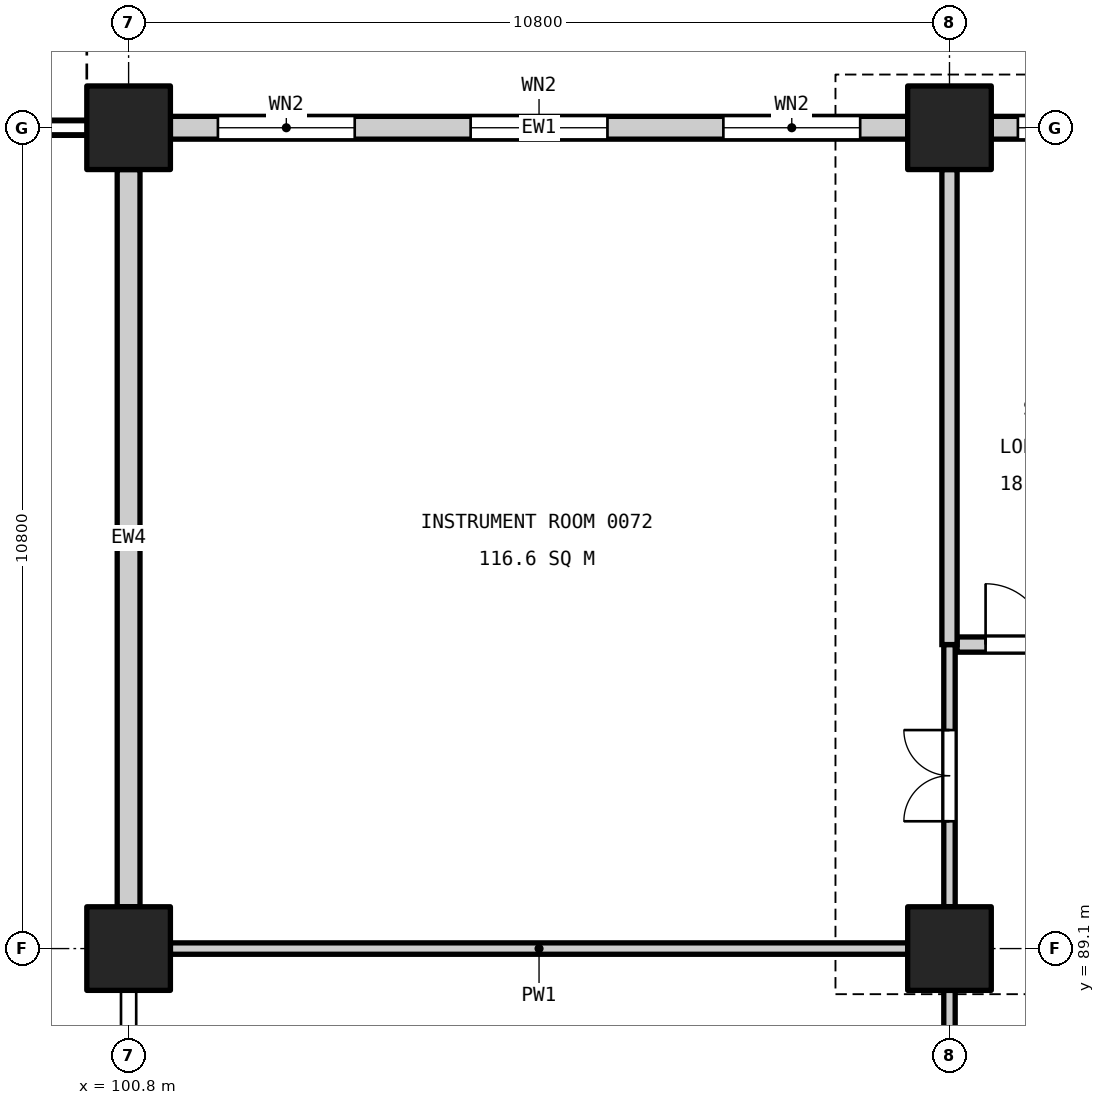
"""IFC4 building model, lengths in metres.
Left out: names, types, materials, properties, quantities, classifications, styles, units other than length and angle.
Written with IfcOpenShell. Run it as: python <this file> out.ifc"""

import sys

from ifc_helpers import new_model, si_unit, direction, frame, frame_2d, origin, origin_2d, place, context, subcontext, project, spatial, rectangle, extrude, element, fill, save


model = new_model("IFC4")
c1 = context("Model", 3, precision=1e-05, world=origin(), true_north=direction((0.0, 1.0)))
c2 = subcontext(c1, "Body", "Model", "MODEL_VIEW")
j1 = project(units=[si_unit("LENGTHUNIT", "METRE"), si_unit("PLANEANGLEUNIT", "RADIAN")], contexts=[c1])
p1 = place(None, origin())
s1 = spatial("IfcSite", under=j1, at=p1, CompositionType="ELEMENT")
p2 = place(p1, origin())
s2 = spatial("IfcBuilding", under=s1, at=p2, CompositionType="ELEMENT")
p3 = place(p2, origin())
s3 = spatial("IfcBuildingStorey", under=s2, at=p3, CompositionType="ELEMENT", Elevation=0.0)
for number, where, z_axis, x_axis in (
    (1, (111.6, 89.1, 0.0), (0.0, 0.0, 1.0), (1.0, 0.0, 0.0)),
    (2, (111.6, 99.9, 0.0), (0.0, 0.0, 1.0), (1.0, 0.0, 0.0)),
    (3, (100.8, 89.1, 0.0), (0.0, 0.0, 1.0), (1.0, 0.0, 0.0)),
    (4, (100.8, 99.9, 0.0), (0.0, 0.0, 1.0), (1.0, 0.0, 0.0)),
):
    element("IfcColumn", number, at=place(p3, frame(where, z_axis=z_axis, x_axis=x_axis)), inside=s3, PredefinedType="COLUMN", context=c2, shape_type="SweptSolid", body=[
        extrude(rectangle(XDim=1.1, YDim=1.1, at=origin_2d()), origin(), (0.0, 0.0, 1.0), 6.0),
    ])
p4 = place(p3, frame((79.75, 99.9, 0.0), z_axis=(0.0, 0.0, 1.0), x_axis=(1.0, 0.0, 0.0)))
e5 = element("IfcWall", 5, at=p4, inside=s3, PredefinedType="SOLIDWALL", context=c2, shape_type="SweptSolid", body=[
    extrude(rectangle(XDim=20.5, YDim=0.2, at=frame_2d((10.25, 0.0))), origin(), (0.0, 0.0, 1.0), 2.6),
])
p5 = place(p4, frame((0.608, 0.0, 0.0)))
e6 = element("IfcOpeningElement", 6, at=p5, cuts=e5, PredefinedType="OPENING", context=c2, shape_type="SweptSolid", body=[
    extrude(rectangle(XDim=2.2, YDim=2.4, at=frame_2d((1.1, 1.2))), frame((0.0, 0.11, 0.0), z_axis=(0.0, -1.0, 0.0), x_axis=(1.0, 0.0, 0.0)), (0.0, 0.0, 1.0), 0.22),
])
p6 = place(p4, frame((4.025, 0.0, 0.0)))
e7 = element("IfcOpeningElement", 7, at=p6, cuts=e5, PredefinedType="OPENING", context=c2, shape_type="SweptSolid", body=[
    extrude(rectangle(XDim=2.2, YDim=2.4, at=frame_2d((1.1, 1.2))), frame((0.0, 0.11, 0.0), z_axis=(0.0, -1.0, 0.0), x_axis=(1.0, 0.0, 0.0)), (0.0, 0.0, 1.0), 0.22),
])
p7 = place(p4, frame((7.442, 0.0, 0.0)))
e8 = element("IfcOpeningElement", 8, at=p7, cuts=e5, PredefinedType="OPENING", context=c2, shape_type="SweptSolid", body=[
    extrude(rectangle(XDim=2.2, YDim=2.4, at=frame_2d((1.1, 1.2))), frame((0.0, 0.11, 0.0), z_axis=(0.0, -1.0, 0.0), x_axis=(1.0, 0.0, 0.0)), (0.0, 0.0, 1.0), 0.22),
])
p8 = place(p4, frame((10.858, 0.0, 0.0)))
e9 = element("IfcOpeningElement", 9, at=p8, cuts=e5, PredefinedType="OPENING", context=c2, shape_type="SweptSolid", body=[
    extrude(rectangle(XDim=2.2, YDim=2.4, at=frame_2d((1.1, 1.2))), frame((0.0, 0.11, 0.0), z_axis=(0.0, -1.0, 0.0), x_axis=(1.0, 0.0, 0.0)), (0.0, 0.0, 1.0), 0.22),
])
p9 = place(p4, frame((14.275, 0.0, 0.0)))
e10 = element("IfcOpeningElement", 10, at=p9, cuts=e5, PredefinedType="OPENING", context=c2, shape_type="SweptSolid", body=[
    extrude(rectangle(XDim=2.2, YDim=2.4, at=frame_2d((1.1, 1.2))), frame((0.0, 0.11, 0.0), z_axis=(0.0, -1.0, 0.0), x_axis=(1.0, 0.0, 0.0)), (0.0, 0.0, 1.0), 0.22),
])
p10 = place(p4, frame((17.692, 0.0, 0.0)))
e11 = element("IfcOpeningElement", 11, at=p10, cuts=e5, PredefinedType="OPENING", context=c2, shape_type="SweptSolid", body=[
    extrude(rectangle(XDim=2.2, YDim=2.4, at=frame_2d((1.1, 1.2))), frame((0.0, 0.11, 0.0), z_axis=(0.0, -1.0, 0.0), x_axis=(1.0, 0.0, 0.0)), (0.0, 0.0, 1.0), 0.22),
])
p11 = place(p3, frame((114.05, 99.9, 0.0), z_axis=(0.0, 0.0, 1.0), x_axis=(-1.0, 0.0, 0.0)))
e12 = element("IfcWall", 12, at=p11, inside=s3, PredefinedType="STANDARD", context=c2, shape_type="SweptSolid", body=[
    extrude(rectangle(XDim=1.9, YDim=0.3, at=frame_2d((0.95, 0.0))), origin(), (0.0, 0.0, 1.0), 4.9),
])
p12 = place(p11, frame((0.35, 0.0, 0.9)))
e13 = element("IfcOpeningElement", 13, at=p12, cuts=e12, PredefinedType="OPENING", context=c2, shape_type="SweptSolid", body=[
    extrude(rectangle(XDim=1.2, YDim=2.4, at=frame_2d((0.6, 1.2))), frame((0.0, 0.16, 0.0), z_axis=(0.0, -1.0, 0.0), x_axis=(1.0, 0.0, 0.0)), (0.0, 0.0, 1.0), 0.32),
])
p13 = place(p3, frame((111.05, 99.9, 0.0), z_axis=(0.0, 0.0, 1.0), x_axis=(-1.0, 0.0, 0.0)))
e14 = element("IfcWall", 14, at=p13, inside=s3, PredefinedType="STANDARD", context=c2, shape_type="SweptSolid", body=[
    extrude(rectangle(XDim=9.7, YDim=0.3, at=frame_2d((4.85, 0.0))), origin(), (0.0, 0.0, 1.0), 4.9),
])
p14 = place(p13, frame((0.625, 0.0, 0.9)))
e15 = element("IfcOpeningElement", 15, at=p14, cuts=e14, PredefinedType="OPENING", context=c2, shape_type="SweptSolid", body=[
    extrude(rectangle(XDim=1.8, YDim=3.0, at=frame_2d((0.9, 1.5))), frame((0.0, 0.16, 0.0), z_axis=(0.0, -1.0, 0.0), x_axis=(1.0, 0.0, 0.0)), (0.0, 0.0, 1.0), 0.32),
])
p15 = place(p13, frame((3.95, 0.0, 0.9)))
e16 = element("IfcOpeningElement", 16, at=p15, cuts=e14, PredefinedType="OPENING", context=c2, shape_type="SweptSolid", body=[
    extrude(rectangle(XDim=1.8, YDim=3.0, at=frame_2d((0.9, 1.5))), frame((0.0, 0.16, 0.0), z_axis=(0.0, -1.0, 0.0), x_axis=(1.0, 0.0, 0.0)), (0.0, 0.0, 1.0), 0.32),
])
p16 = place(p13, frame((7.275, 0.0, 0.9)))
e17 = element("IfcOpeningElement", 17, at=p16, cuts=e14, PredefinedType="OPENING", context=c2, shape_type="SweptSolid", body=[
    extrude(rectangle(XDim=1.8, YDim=3.0, at=frame_2d((0.9, 1.5))), frame((0.0, 0.16, 0.0), z_axis=(0.0, -1.0, 0.0), x_axis=(1.0, 0.0, 0.0)), (0.0, 0.0, 1.0), 0.32),
])
p17 = place(p3, frame((100.8, 89.65, 0.0), z_axis=(0.0, 0.0, 1.0), x_axis=(0.0, 1.0, 0.0)))
e18 = element("IfcWall", 18, at=p17, inside=s3, PredefinedType="STANDARD", context=c2, shape_type="SweptSolid", body=[
    extrude(rectangle(XDim=9.7, YDim=0.3, at=frame_2d((4.85, 0.0))), origin(), (0.0, 0.0, 1.0), 4.6),
])
p18 = place(p3, frame((114.05, 93.1, 0.0), z_axis=(0.0, 0.0, 1.0), x_axis=(-1.0, 0.0, 0.0)))
e19 = element("IfcWall", 19, at=p18, inside=s3, PredefinedType="PARTITIONING", context=c2, shape_type="SweptSolid", body=[
    extrude(rectangle(XDim=2.35, YDim=0.2, at=frame_2d((1.175, 0.0))), origin(), (0.0, 0.0, 1.0), 4.6),
])
p19 = place(p18, frame((0.375, 0.0, 0.0)))
e20 = element("IfcOpeningElement", 20, at=p19, cuts=e19, PredefinedType="OPENING", context=c2, shape_type="SweptSolid", body=[
    extrude(rectangle(XDim=1.6, YDim=2.1, at=frame_2d((0.8, 1.05))), frame((0.0, 0.11, 0.0), z_axis=(0.0, -1.0, 0.0), x_axis=(1.0, 0.0, 0.0)), (0.0, 0.0, 1.0), 0.22),
])
p20 = place(p3, frame((111.6, 78.85, 0.0), z_axis=(0.0, 0.0, 1.0), x_axis=(0.0, 1.0, 0.0)))
e21 = element("IfcWall", 21, at=p20, inside=s3, PredefinedType="PARTITIONING", context=c2, shape_type="SweptSolid", body=[
    extrude(rectangle(XDim=9.7, YDim=0.15, at=frame_2d((4.85, 0.0))), origin(), (0.0, 0.0, 1.0), 4.6),
])
p21 = place(p20, frame((2.725, 0.0, 0.0)))
e22 = element("IfcOpeningElement", 22, at=p21, cuts=e21, PredefinedType="OPENING", context=c2, shape_type="SweptSolid", body=[
    extrude(rectangle(XDim=1.2, YDim=2.1, at=frame_2d((0.6, 1.05))), frame((0.0, 0.085, 0.0), z_axis=(0.0, -1.0, 0.0), x_axis=(1.0, 0.0, 0.0)), (0.0, 0.0, 1.0), 0.17),
])
p22 = place(p20, frame((7.575, 0.0, 0.0)))
e23 = element("IfcOpeningElement", 23, at=p22, cuts=e21, PredefinedType="OPENING", context=c2, shape_type="SweptSolid", body=[
    extrude(rectangle(XDim=1.2, YDim=2.1, at=frame_2d((0.6, 1.05))), frame((0.0, 0.085, 0.0), z_axis=(0.0, -1.0, 0.0), x_axis=(1.0, 0.0, 0.0)), (0.0, 0.0, 1.0), 0.17),
])
p23 = place(p3, frame((111.6, 89.65, 0.0), z_axis=(0.0, 0.0, 1.0), x_axis=(0.0, 1.0, 0.0)))
e24 = element("IfcWall", 24, at=p23, inside=s3, PredefinedType="PARTITIONING", context=c2, shape_type="SweptSolid", body=[
    extrude(rectangle(XDim=3.45, YDim=0.15, at=frame_2d((1.725, 0.0))), origin(), (0.0, 0.0, 1.0), 4.6),
])
p24 = place(p23, frame((1.125, 0.0, 0.0)))
e25 = element("IfcOpeningElement", 25, at=p24, cuts=e24, PredefinedType="OPENING", context=c2, shape_type="SweptSolid", body=[
    extrude(rectangle(XDim=1.2, YDim=2.1, at=frame_2d((0.6, 1.05))), frame((0.0, 0.085, 0.0), z_axis=(0.0, -1.0, 0.0), x_axis=(1.0, 0.0, 0.0)), (0.0, 0.0, 1.0), 0.17),
])
p25 = place(p3, frame((111.6, 93.1, 0.0), z_axis=(0.0, 0.0, 1.0), x_axis=(0.0, 1.0, 0.0)))
e26 = element("IfcWall", 26, at=p25, inside=s3, PredefinedType="PARTITIONING", context=c2, shape_type="SweptSolid", body=[
    extrude(rectangle(XDim=6.25, YDim=0.2, at=frame_2d((3.125, 0.0))), origin(), (0.0, 0.0, 1.0), 4.6),
])
p26 = place(p3, frame((111.05, 89.1, 0.0), z_axis=(0.0, 0.0, 1.0), x_axis=(-1.0, 0.0, 0.0)))
e27 = element("IfcWall", 27, at=p26, inside=s3, PredefinedType="PARTITIONING", context=c2, shape_type="SweptSolid", body=[
    extrude(rectangle(XDim=9.7, YDim=0.15, at=frame_2d((4.85, 0.0))), origin(), (0.0, 0.0, 1.0), 4.9),
])
p27 = place(p12, origin())
e28 = element("IfcWindow", 28, at=p27, inside=s3, PartitioningType="SINGLE_PANEL", PredefinedType="WINDOW", context=c2, shape_type="SweptSolid", body=[
    extrude(rectangle(XDim=1.2, YDim=2.4, at=frame_2d((0.6, 1.2))), frame((0.0, 0.03, 0.0), z_axis=(0.0, -1.0, 0.0), x_axis=(1.0, 0.0, 0.0)), (0.0, 0.0, 1.0), 0.06),
])
fill(e13, e28)
p28 = place(p14, origin())
e29 = element("IfcWindow", 29, at=p28, inside=s3, PartitioningType="SINGLE_PANEL", PredefinedType="WINDOW", context=c2, shape_type="SweptSolid", body=[
    extrude(rectangle(XDim=1.8, YDim=3.0, at=frame_2d((0.9, 1.5))), frame((0.0, 0.03, 0.0), z_axis=(0.0, -1.0, 0.0), x_axis=(1.0, 0.0, 0.0)), (0.0, 0.0, 1.0), 0.06),
])
fill(e15, e29)
p29 = place(p15, origin())
e30 = element("IfcWindow", 30, at=p29, inside=s3, PartitioningType="SINGLE_PANEL", PredefinedType="WINDOW", context=c2, shape_type="SweptSolid", body=[
    extrude(rectangle(XDim=1.8, YDim=3.0, at=frame_2d((0.9, 1.5))), frame((0.0, 0.03, 0.0), z_axis=(0.0, -1.0, 0.0), x_axis=(1.0, 0.0, 0.0)), (0.0, 0.0, 1.0), 0.06),
])
fill(e16, e30)
p30 = place(p16, origin())
e31 = element("IfcWindow", 31, at=p30, inside=s3, PartitioningType="SINGLE_PANEL", PredefinedType="WINDOW", context=c2, shape_type="SweptSolid", body=[
    extrude(rectangle(XDim=1.8, YDim=3.0, at=frame_2d((0.9, 1.5))), frame((0.0, 0.03, 0.0), z_axis=(0.0, -1.0, 0.0), x_axis=(1.0, 0.0, 0.0)), (0.0, 0.0, 1.0), 0.06),
])
fill(e17, e31)
p31 = place(p24, origin())
e32 = element("IfcDoor", 32, at=p31, inside=s3, OperationType="DOUBLE_DOOR_SINGLE_SWING", PredefinedType="DOOR", context=c2, shape_type="SweptSolid", body=[
    extrude(rectangle(XDim=1.2, YDim=2.1, at=frame_2d((0.6, 1.05))), frame((0.0, 0.025, 0.0), z_axis=(0.0, -1.0, 0.0), x_axis=(1.0, 0.0, 0.0)), (0.0, 0.0, 1.0), 0.05),
])
fill(e25, e32)
p32 = place(p19, frame((1.6, 0.0, 0.0), z_axis=(0.0, 0.0, 1.0), x_axis=(-1.0, 0.0, 0.0)))
e33 = element("IfcDoor", 33, at=p32, inside=s3, OperationType="DOUBLE_DOOR_SINGLE_SWING", PredefinedType="DOOR", context=c2, shape_type="SweptSolid", body=[
    extrude(rectangle(XDim=1.6, YDim=2.1, at=frame_2d((0.8, 1.05))), frame((0.0, 0.025, 0.0), z_axis=(0.0, -1.0, 0.0), x_axis=(1.0, 0.0, 0.0)), (0.0, 0.0, 1.0), 0.05),
])
fill(e20, e33)
save(model, sys.argv[1])
